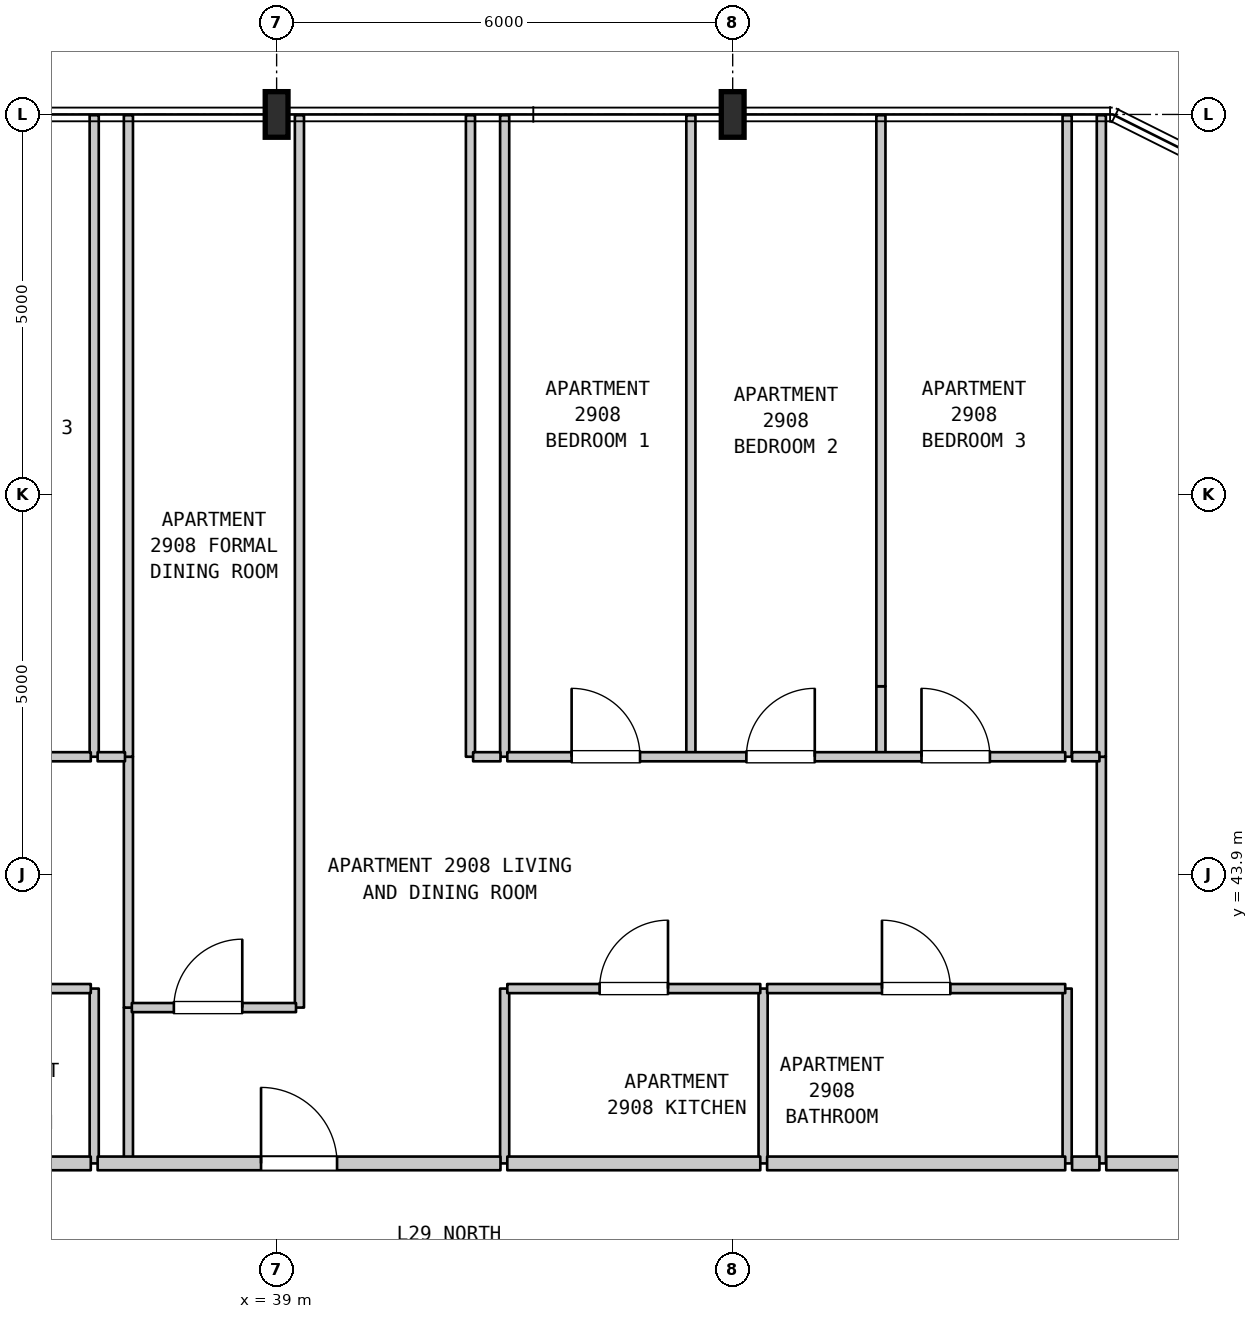
"""IFC4 building model, lengths in metres.
Left out: names, types, materials, properties, quantities, classifications, styles, units other than length and angle.
Written with IfcOpenShell. Run it as: python <this file> out.ifc"""

import sys

from ifc_helpers import new_model, si_unit, direction, frame, frame_2d, origin, origin_2d, place, context, subcontext, project, spatial, rectangle, i_section, extrude, element, fill, save


model = new_model("IFC4")
c1 = context("Model", 3, precision=1e-05, world=origin(), true_north=direction((0.0, 1.0)))
c2 = subcontext(c1, "Body", "Model", "MODEL_VIEW")
j1 = project(units=[si_unit("LENGTHUNIT", "METRE"), si_unit("PLANEANGLEUNIT", "RADIAN")], contexts=[c1])
p1 = place(None, origin())
s1 = spatial("IfcSite", under=j1, at=p1, CompositionType="ELEMENT")
p2 = place(p1, origin())
s2 = spatial("IfcBuilding", under=s1, at=p2, CompositionType="ELEMENT")
p3 = place(p2, frame((0.0, 0.0, 120.5)))
s3 = spatial("IfcBuildingStorey", under=s2, at=p3, CompositionType="ELEMENT", Elevation=120.5)
for number, where, z_axis, x_axis in (
    (1, (39.0, 53.9, 0.0), (0.0, 0.0, 1.0), (1.0, 0.0, 0.0)),
    (2, (45.0, 53.9, 0.0), (0.0, 0.0, 1.0), (1.0, 0.0, 0.0)),
):
    element("IfcColumn", number, at=place(p3, frame(where, z_axis=z_axis, x_axis=x_axis)), inside=s3, PredefinedType="COLUMN", context=c2, shape_type="SweptSolid", body=[
        extrude(i_section(OverallWidth=0.3, OverallDepth=0.6, WebThickness=0.015, FlangeThickness=0.03, FilletRadius=0.027, at=origin_2d()), origin(), (0.0, 0.0, 1.0), 4.8),
    ])
p4 = place(p3, frame((36.6, 40.1, 0.0), z_axis=(0.0, 0.0, 1.0), x_axis=(0.0, 1.0, 0.0)))
e3 = element("IfcWall", 3, at=p4, inside=s3, PredefinedType="PARTITIONING", context=c2, shape_type="SweptSolid", body=[
    extrude(rectangle(XDim=2.3, YDim=0.12, at=frame_2d((1.15, 0.0))), origin(), (0.0, 0.0, 1.0), 4.48),
])
p5 = place(p3, frame((36.6, 45.45, 0.0), z_axis=(0.0, 0.0, 1.0), x_axis=(0.0, 1.0, 0.0)))
e4 = element("IfcWall", 4, at=p5, inside=s3, PredefinedType="PARTITIONING", context=c2, shape_type="SweptSolid", body=[
    extrude(rectangle(XDim=8.44, YDim=0.12, at=frame_2d((4.22, 0.0))), origin(), (0.0, 0.0, 1.0), 4.48),
])
p6 = place(p3, frame((37.05, 40.1, 0.0), z_axis=(0.0, 0.0, 1.0), x_axis=(0.0, 1.0, 0.0)))
e5 = element("IfcWall", 5, at=p6, inside=s3, PredefinedType="PARTITIONING", context=c2, shape_type="SweptSolid", body=[
    extrude(rectangle(XDim=2.05, YDim=0.12, at=frame_2d((1.025, 0.0))), origin(), (0.0, 0.0, 1.0), 4.48),
])
p7 = place(p3, frame((37.05, 42.15, 0.0), z_axis=(0.0, 0.0, 1.0), x_axis=(0.0, 1.0, 0.0)))
e6 = element("IfcWall", 6, at=p7, inside=s3, PredefinedType="PARTITIONING", context=c2, shape_type="SweptSolid", body=[
    extrude(rectangle(XDim=3.3, YDim=0.12, at=frame_2d((1.65, 0.0))), origin(), (0.0, 0.0, 1.0), 4.48),
])
p8 = place(p3, frame((37.05, 45.45, 0.0), z_axis=(0.0, 0.0, 1.0), x_axis=(0.0, 1.0, 0.0)))
e7 = element("IfcWall", 7, at=p8, inside=s3, PredefinedType="PARTITIONING", context=c2, shape_type="SweptSolid", body=[
    extrude(rectangle(XDim=8.44, YDim=0.12, at=frame_2d((4.22, 0.0))), origin(), (0.0, 0.0, 1.0), 4.48),
])
p9 = place(p3, frame((39.3, 42.15, 0.0), z_axis=(0.0, 0.0, 1.0), x_axis=(0.0, 1.0, 0.0)))
e8 = element("IfcWall", 8, at=p9, inside=s3, PredefinedType="PARTITIONING", context=c2, shape_type="SweptSolid", body=[
    extrude(rectangle(XDim=11.74, YDim=0.12, at=frame_2d((5.87, 0.0))), origin(), (0.0, 0.0, 1.0), 4.48),
])
p10 = place(p3, frame((41.55, 45.45, 0.0), z_axis=(0.0, 0.0, 1.0), x_axis=(0.0, 1.0, 0.0)))
e9 = element("IfcWall", 9, at=p10, inside=s3, PredefinedType="PARTITIONING", context=c2, shape_type="SweptSolid", body=[
    extrude(rectangle(XDim=8.44, YDim=0.12, at=frame_2d((4.22, 0.0))), origin(), (0.0, 0.0, 1.0), 4.48),
])
p11 = place(p3, frame((42.0, 40.1, 0.0), z_axis=(0.0, 0.0, 1.0), x_axis=(0.0, 1.0, 0.0)))
e10 = element("IfcWall", 10, at=p11, inside=s3, PredefinedType="PARTITIONING", context=c2, shape_type="SweptSolid", body=[
    extrude(rectangle(XDim=2.3, YDim=0.12, at=frame_2d((1.15, 0.0))), origin(), (0.0, 0.0, 1.0), 4.48),
])
for number, where, z_axis, x_axis in (
    (11, (42.0, 45.45, 0.0), (0.0, 0.0, 1.0), (0.0, 1.0, 0.0)),
    (12, (44.45, 45.45, 0.0), (0.0, 0.0, 1.0), (0.0, 1.0, 0.0)),
):
    element("IfcWall", number, at=place(p3, frame(where, z_axis=z_axis, x_axis=x_axis)), inside=s3, PredefinedType="PARTITIONING", context=c2, shape_type="SweptSolid", body=[
        extrude(rectangle(XDim=8.44, YDim=0.12, at=frame_2d((4.22, 0.0))), origin(), (0.0, 0.0, 1.0), 4.48),
    ])
p12 = place(p3, frame((45.4, 40.1, 0.0), z_axis=(0.0, 0.0, 1.0), x_axis=(0.0, 1.0, 0.0)))
e13 = element("IfcWall", 13, at=p12, inside=s3, PredefinedType="PARTITIONING", context=c2, shape_type="SweptSolid", body=[
    extrude(rectangle(XDim=2.3, YDim=0.12, at=frame_2d((1.15, 0.0))), origin(), (0.0, 0.0, 1.0), 4.48),
])
p13 = place(p3, frame((46.95, 45.45, 0.0), z_axis=(0.0, 0.0, 1.0), x_axis=(0.0, 1.0, 0.0)))
e14 = element("IfcWall", 14, at=p13, inside=s3, PredefinedType="PARTITIONING", context=c2, shape_type="SweptSolid", body=[
    extrude(rectangle(XDim=0.927, YDim=0.12, at=frame_2d((0.464, 0.0))), origin(), (0.0, 0.0, 1.0), 3.88),
])
p14 = place(p3, frame((49.4, 40.1, 0.0), z_axis=(0.0, 0.0, 1.0), x_axis=(0.0, 1.0, 0.0)))
e15 = element("IfcWall", 15, at=p14, inside=s3, PredefinedType="PARTITIONING", context=c2, shape_type="SweptSolid", body=[
    extrude(rectangle(XDim=2.3, YDim=0.12, at=frame_2d((1.15, 0.0))), origin(), (0.0, 0.0, 1.0), 4.48),
])
p15 = place(p3, frame((49.4, 45.45, 0.0), z_axis=(0.0, 0.0, 1.0), x_axis=(0.0, 1.0, 0.0)))
e16 = element("IfcWall", 16, at=p15, inside=s3, PredefinedType="PARTITIONING", context=c2, shape_type="SweptSolid", body=[
    extrude(rectangle(XDim=8.44, YDim=0.12, at=frame_2d((4.22, 0.0))), origin(), (0.0, 0.0, 1.0), 4.48),
])
p16 = place(p3, frame((49.85, 40.1, 0.0), z_axis=(0.0, 0.0, 1.0), x_axis=(0.0, 1.0, 0.0)))
e17 = element("IfcWall", 17, at=p16, inside=s3, PredefinedType="PARTITIONING", context=c2, shape_type="SweptSolid", body=[
    extrude(rectangle(XDim=5.35, YDim=0.12, at=frame_2d((2.675, 0.0))), origin(), (0.0, 0.0, 1.0), 4.48),
])
p17 = place(p3, frame((49.85, 45.45, 0.0), z_axis=(0.0, 0.0, 1.0), x_axis=(0.0, 1.0, 0.0)))
e18 = element("IfcWall", 18, at=p17, inside=s3, PredefinedType="PARTITIONING", context=c2, shape_type="SweptSolid", body=[
    extrude(rectangle(XDim=8.44, YDim=0.12, at=frame_2d((4.22, 0.0))), origin(), (0.0, 0.0, 1.0), 4.48),
])
p18 = place(p3, frame((34.363, 40.1, 0.0), z_axis=(0.0, 0.0, 1.0), x_axis=(1.0, 0.0, 0.0)))
e19 = element("IfcWall", 19, at=p18, inside=s3, PredefinedType="STANDARD", context=c2, shape_type="SweptSolid", body=[
    extrude(rectangle(XDim=2.192, YDim=0.18, at=frame_2d((1.096, 0.0))), origin(), (0.0, 0.0, 1.0), 4.48),
])
p19 = place(p3, frame((36.645, 40.1, 0.0), z_axis=(0.0, 0.0, 1.0), x_axis=(1.0, 0.0, 0.0)))
e20 = element("IfcWall", 20, at=p19, inside=s3, PredefinedType="STANDARD", context=c2, shape_type="SweptSolid", body=[
    extrude(rectangle(XDim=5.3, YDim=0.18, at=frame_2d((2.65, 0.0))), origin(), (0.0, 0.0, 1.0), 4.48),
])
p20 = place(p19, frame((2.15, 0.0, 0.0)))
e21 = element("IfcOpeningElement", 21, at=p20, cuts=e20, PredefinedType="OPENING", context=c2, shape_type="SweptSolid", body=[
    extrude(rectangle(XDim=1.0, YDim=2.15, at=frame_2d((0.5, 1.075))), frame((0.0, 0.1, 0.0), z_axis=(0.0, -1.0, 0.0), x_axis=(1.0, 0.0, 0.0)), (0.0, 0.0, 1.0), 0.2),
])
p21 = place(p3, frame((42.035, 40.1, 0.0), z_axis=(0.0, 0.0, 1.0), x_axis=(1.0, 0.0, 0.0)))
e22 = element("IfcWall", 22, at=p21, inside=s3, PredefinedType="STANDARD", context=c2, shape_type="SweptSolid", body=[
    extrude(rectangle(XDim=3.328, YDim=0.18, at=frame_2d((1.664, 0.0))), origin(), (0.0, 0.0, 1.0), 4.48),
])
p22 = place(p3, frame((45.453, 40.1, 0.0), z_axis=(0.0, 0.0, 1.0), x_axis=(1.0, 0.0, 0.0)))
e23 = element("IfcWall", 23, at=p22, inside=s3, PredefinedType="STANDARD", context=c2, shape_type="SweptSolid", body=[
    extrude(rectangle(XDim=3.922, YDim=0.18, at=frame_2d((1.961, 0.0))), origin(), (0.0, 0.0, 1.0), 4.48),
])
p23 = place(p3, frame((49.465, 40.1, 0.0), z_axis=(0.0, 0.0, 1.0), x_axis=(1.0, 0.0, 0.0)))
e24 = element("IfcWall", 24, at=p23, inside=s3, PredefinedType="STANDARD", context=c2, shape_type="SweptSolid", body=[
    extrude(rectangle(XDim=0.36, YDim=0.18, at=frame_2d((0.18, 0.0))), origin(), (0.0, 0.0, 1.0), 4.48),
])
p24 = place(p3, frame((49.915, 40.1, 0.0), z_axis=(0.0, 0.0, 1.0), x_axis=(1.0, 0.0, 0.0)))
e25 = element("IfcWall", 25, at=p24, inside=s3, PredefinedType="STANDARD", context=c2, shape_type="SweptSolid", body=[
    extrude(rectangle(XDim=4.21, YDim=0.18, at=frame_2d((2.105, 0.0))), origin(), (0.0, 0.0, 1.0), 4.48),
])
p25 = place(p24, frame((1.605, 0.0, 0.0)))
e26 = element("IfcOpeningElement", 26, at=p25, cuts=e25, PredefinedType="OPENING", context=c2, shape_type="SweptSolid", body=[
    extrude(rectangle(XDim=1.0, YDim=2.15, at=frame_2d((0.5, 1.075))), frame((0.0, 0.1, 0.0), z_axis=(0.0, -1.0, 0.0), x_axis=(1.0, 0.0, 0.0)), (0.0, 0.0, 1.0), 0.2),
])
p26 = place(p3, frame((37.095, 42.15, 0.0), z_axis=(0.0, 0.0, 1.0), x_axis=(1.0, 0.0, 0.0)))
e27 = element("IfcWall", 27, at=p26, inside=s3, PredefinedType="PARTITIONING", context=c2, shape_type="SweptSolid", body=[
    extrude(rectangle(XDim=2.16, YDim=0.12, at=frame_2d((1.08, 0.0))), origin(), (0.0, 0.0, 1.0), 4.48),
])
p27 = place(p26, frame((0.553, 0.0, 0.0)))
e28 = element("IfcOpeningElement", 28, at=p27, cuts=e27, PredefinedType="OPENING", context=c2, shape_type="SweptSolid", body=[
    extrude(rectangle(XDim=0.9, YDim=2.15, at=frame_2d((0.45, 1.075))), frame((0.0, 0.07, 0.0), z_axis=(0.0, -1.0, 0.0), x_axis=(1.0, 0.0, 0.0)), (0.0, 0.0, 1.0), 0.14),
])
p28 = place(p3, frame((34.363, 42.4, 0.0), z_axis=(0.0, 0.0, 1.0), x_axis=(1.0, 0.0, 0.0)))
e29 = element("IfcWall", 29, at=p28, inside=s3, PredefinedType="PARTITIONING", context=c2, shape_type="SweptSolid", body=[
    extrude(rectangle(XDim=2.192, YDim=0.12, at=frame_2d((1.096, 0.0))), origin(), (0.0, 0.0, 1.0), 4.48),
])
p29 = place(p28, frame((0.646, 0.0, 0.0)))
e30 = element("IfcOpeningElement", 30, at=p29, cuts=e29, PredefinedType="OPENING", context=c2, shape_type="SweptSolid", body=[
    extrude(rectangle(XDim=0.9, YDim=2.1, at=frame_2d((0.45, 1.05))), frame((0.0, 0.07, 0.0), z_axis=(0.0, -1.0, 0.0), x_axis=(1.0, 0.0, 0.0)), (0.0, 0.0, 1.0), 0.14),
])
p30 = place(p3, frame((42.035, 42.4, 0.0), z_axis=(0.0, 0.0, 1.0), x_axis=(1.0, 0.0, 0.0)))
e31 = element("IfcWall", 31, at=p30, inside=s3, PredefinedType="PARTITIONING", context=c2, shape_type="SweptSolid", body=[
    extrude(rectangle(XDim=3.328, YDim=0.12, at=frame_2d((1.664, 0.0))), origin(), (0.0, 0.0, 1.0), 4.48),
])
p31 = place(p30, frame((1.214, 0.0, 0.0)))
e32 = element("IfcOpeningElement", 32, at=p31, cuts=e31, PredefinedType="OPENING", context=c2, shape_type="SweptSolid", body=[
    extrude(rectangle(XDim=0.9, YDim=2.15, at=frame_2d((0.45, 1.075))), frame((0.0, 0.07, 0.0), z_axis=(0.0, -1.0, 0.0), x_axis=(1.0, 0.0, 0.0)), (0.0, 0.0, 1.0), 0.14),
])
p32 = place(p3, frame((45.453, 42.4, 0.0), z_axis=(0.0, 0.0, 1.0), x_axis=(1.0, 0.0, 0.0)))
e33 = element("IfcWall", 33, at=p32, inside=s3, PredefinedType="PARTITIONING", context=c2, shape_type="SweptSolid", body=[
    extrude(rectangle(XDim=3.922, YDim=0.12, at=frame_2d((1.961, 0.0))), origin(), (0.0, 0.0, 1.0), 4.48),
])
p33 = place(p32, frame((1.511, 0.0, 0.0)))
e34 = element("IfcOpeningElement", 34, at=p33, cuts=e33, PredefinedType="OPENING", context=c2, shape_type="SweptSolid", body=[
    extrude(rectangle(XDim=0.9, YDim=2.1, at=frame_2d((0.45, 1.05))), frame((0.0, 0.07, 0.0), z_axis=(0.0, -1.0, 0.0), x_axis=(1.0, 0.0, 0.0)), (0.0, 0.0, 1.0), 0.14),
])
p34 = place(p3, frame((28.495, 45.45, 0.0), z_axis=(0.0, 0.0, 1.0), x_axis=(1.0, 0.0, 0.0)))
e35 = element("IfcWall", 35, at=p34, inside=s3, PredefinedType="PARTITIONING", context=c2, shape_type="SweptSolid", body=[
    extrude(rectangle(XDim=8.06, YDim=0.12, at=frame_2d((4.03, 0.0))), origin(), (0.0, 0.0, 1.0), 4.48),
])
p35 = place(p34, frame((0.968, 0.0, 0.0)))
e36 = element("IfcOpeningElement", 36, at=p35, cuts=e35, PredefinedType="OPENING", context=c2, shape_type="SweptSolid", body=[
    extrude(rectangle(XDim=0.9, YDim=2.15, at=frame_2d((0.45, 1.075))), frame((0.0, 0.07, 0.0), z_axis=(0.0, -1.0, 0.0), x_axis=(1.0, 0.0, 0.0)), (0.0, 0.0, 1.0), 0.14),
])
p36 = place(p34, frame((3.507, 0.0, 0.0)))
e37 = element("IfcOpeningElement", 37, at=p36, cuts=e35, PredefinedType="OPENING", context=c2, shape_type="SweptSolid", body=[
    extrude(rectangle(XDim=0.9, YDim=2.15, at=frame_2d((0.45, 1.075))), frame((0.0, 0.07, 0.0), z_axis=(0.0, -1.0, 0.0), x_axis=(1.0, 0.0, 0.0)), (0.0, 0.0, 1.0), 0.14),
])
p37 = place(p34, frame((6.051, 0.0, 0.0)))
e38 = element("IfcOpeningElement", 38, at=p37, cuts=e35, PredefinedType="OPENING", context=c2, shape_type="SweptSolid", body=[
    extrude(rectangle(XDim=0.9, YDim=2.15, at=frame_2d((0.45, 1.075))), frame((0.0, 0.07, 0.0), z_axis=(0.0, -1.0, 0.0), x_axis=(1.0, 0.0, 0.0)), (0.0, 0.0, 1.0), 0.14),
])
p38 = place(p3, frame((36.645, 45.45, 0.0), z_axis=(0.0, 0.0, 1.0), x_axis=(1.0, 0.0, 0.0)))
e39 = element("IfcWall", 39, at=p38, inside=s3, PredefinedType="PARTITIONING", context=c2, shape_type="SweptSolid", body=[
    extrude(rectangle(XDim=0.36, YDim=0.12, at=frame_2d((0.18, 0.0))), origin(), (0.0, 0.0, 1.0), 4.48),
])
p39 = place(p3, frame((41.585, 45.45, 0.0), z_axis=(0.0, 0.0, 1.0), x_axis=(1.0, 0.0, 0.0)))
e40 = element("IfcWall", 40, at=p39, inside=s3, PredefinedType="PARTITIONING", context=c2, shape_type="SweptSolid", body=[
    extrude(rectangle(XDim=0.36, YDim=0.12, at=frame_2d((0.18, 0.0))), origin(), (0.0, 0.0, 1.0), 4.48),
])
p40 = place(p3, frame((42.035, 45.45, 0.0), z_axis=(0.0, 0.0, 1.0), x_axis=(1.0, 0.0, 0.0)))
e41 = element("IfcWall", 41, at=p40, inside=s3, PredefinedType="PARTITIONING", context=c2, shape_type="SweptSolid", body=[
    extrude(rectangle(XDim=7.34, YDim=0.12, at=frame_2d((3.67, 0.0))), origin(), (0.0, 0.0, 1.0), 4.48),
])
p41 = place(p40, frame((0.846, 0.0, 0.0)))
e42 = element("IfcOpeningElement", 42, at=p41, cuts=e41, PredefinedType="OPENING", context=c2, shape_type="SweptSolid", body=[
    extrude(rectangle(XDim=0.9, YDim=2.15, at=frame_2d((0.45, 1.075))), frame((0.0, 0.07, 0.0), z_axis=(0.0, -1.0, 0.0), x_axis=(1.0, 0.0, 0.0)), (0.0, 0.0, 1.0), 0.14),
])
p42 = place(p40, frame((3.145, 0.0, 0.0)))
e43 = element("IfcOpeningElement", 43, at=p42, cuts=e41, PredefinedType="OPENING", context=c2, shape_type="SweptSolid", body=[
    extrude(rectangle(XDim=0.9, YDim=2.15, at=frame_2d((0.45, 1.075))), frame((0.0, 0.07, 0.0), z_axis=(0.0, -1.0, 0.0), x_axis=(1.0, 0.0, 0.0)), (0.0, 0.0, 1.0), 0.14),
])
p43 = place(p40, frame((5.449, 0.0, 0.0)))
e44 = element("IfcOpeningElement", 44, at=p43, cuts=e41, PredefinedType="OPENING", context=c2, shape_type="SweptSolid", body=[
    extrude(rectangle(XDim=0.9, YDim=2.15, at=frame_2d((0.45, 1.075))), frame((0.0, 0.07, 0.0), z_axis=(0.0, -1.0, 0.0), x_axis=(1.0, 0.0, 0.0)), (0.0, 0.0, 1.0), 0.14),
])
p44 = place(p3, frame((49.465, 45.45, 0.0), z_axis=(0.0, 0.0, 1.0), x_axis=(1.0, 0.0, 0.0)))
e45 = element("IfcWall", 45, at=p44, inside=s3, PredefinedType="PARTITIONING", context=c2, shape_type="SweptSolid", body=[
    extrude(rectangle(XDim=0.36, YDim=0.12, at=frame_2d((0.18, 0.0))), origin(), (0.0, 0.0, 1.0), 4.48),
])
p45 = place(p3, frame((46.95, 46.377, 0.0), z_axis=(0.0, 0.0, 1.0), x_axis=(0.0, 1.0, 0.0)))
e46 = element("IfcWall", 46, at=p45, inside=s3, PredefinedType="PARTITIONING", context=c2, shape_type="SweptSolid", body=[
    extrude(rectangle(XDim=7.513, YDim=0.12, at=frame_2d((3.756, 0.0))), origin(), (0.0, 0.0, 1.0), 4.48),
])
p46 = place(p20, origin())
e47 = element("IfcDoor", 47, at=p46, inside=s3, OperationType="SINGLE_SWING_LEFT", PredefinedType="DOOR", context=c2, shape_type="SweptSolid", body=[
    extrude(rectangle(XDim=1.0, YDim=2.15, at=frame_2d((0.5, 1.075))), frame((0.0, 0.025, 0.0), z_axis=(0.0, -1.0, 0.0), x_axis=(1.0, 0.0, 0.0)), (0.0, 0.0, 1.0), 0.05),
])
fill(e21, e47)
p47 = place(p27, origin())
e48 = element("IfcDoor", 48, at=p47, inside=s3, OperationType="SINGLE_SWING_RIGHT", PredefinedType="DOOR", context=c2, shape_type="SweptSolid", body=[
    extrude(rectangle(XDim=0.9, YDim=2.15, at=frame_2d((0.45, 1.075))), frame((0.0, 0.025, 0.0), z_axis=(0.0, -1.0, 0.0), x_axis=(1.0, 0.0, 0.0)), (0.0, 0.0, 1.0), 0.05),
])
fill(e28, e48)
p48 = place(p31, origin())
e49 = element("IfcDoor", 49, at=p48, inside=s3, OperationType="SINGLE_SWING_RIGHT", PredefinedType="DOOR", context=c2, shape_type="SweptSolid", body=[
    extrude(rectangle(XDim=0.9, YDim=2.15, at=frame_2d((0.45, 1.075))), frame((0.0, 0.025, 0.0), z_axis=(0.0, -1.0, 0.0), x_axis=(1.0, 0.0, 0.0)), (0.0, 0.0, 1.0), 0.05),
])
fill(e32, e49)
p49 = place(p33, origin())
e50 = element("IfcDoor", 50, at=p49, inside=s3, OperationType="SINGLE_SWING_LEFT", PredefinedType="DOOR", context=c2, shape_type="SweptSolid", body=[
    extrude(rectangle(XDim=0.9, YDim=2.1, at=frame_2d((0.45, 1.05))), frame((0.0, 0.025, 0.0), z_axis=(0.0, -1.0, 0.0), x_axis=(1.0, 0.0, 0.0)), (0.0, 0.0, 1.0), 0.05),
])
fill(e34, e50)
p50 = place(p41, origin())
e51 = element("IfcDoor", 51, at=p50, inside=s3, OperationType="SINGLE_SWING_LEFT", PredefinedType="DOOR", context=c2, shape_type="SweptSolid", body=[
    extrude(rectangle(XDim=0.9, YDim=2.15, at=frame_2d((0.45, 1.075))), frame((0.0, 0.025, 0.0), z_axis=(0.0, -1.0, 0.0), x_axis=(1.0, 0.0, 0.0)), (0.0, 0.0, 1.0), 0.05),
])
fill(e42, e51)
p51 = place(p42, origin())
e52 = element("IfcDoor", 52, at=p51, inside=s3, OperationType="SINGLE_SWING_RIGHT", PredefinedType="DOOR", context=c2, shape_type="SweptSolid", body=[
    extrude(rectangle(XDim=0.9, YDim=2.15, at=frame_2d((0.45, 1.075))), frame((0.0, 0.025, 0.0), z_axis=(0.0, -1.0, 0.0), x_axis=(1.0, 0.0, 0.0)), (0.0, 0.0, 1.0), 0.05),
])
fill(e43, e52)
p52 = place(p43, origin())
e53 = element("IfcDoor", 53, at=p52, inside=s3, OperationType="SINGLE_SWING_LEFT", PredefinedType="DOOR", context=c2, shape_type="SweptSolid", body=[
    extrude(rectangle(XDim=0.9, YDim=2.15, at=frame_2d((0.45, 1.075))), frame((0.0, 0.025, 0.0), z_axis=(0.0, -1.0, 0.0), x_axis=(1.0, 0.0, 0.0)), (0.0, 0.0, 1.0), 0.05),
])
fill(e44, e53)
save(model, sys.argv[1])
